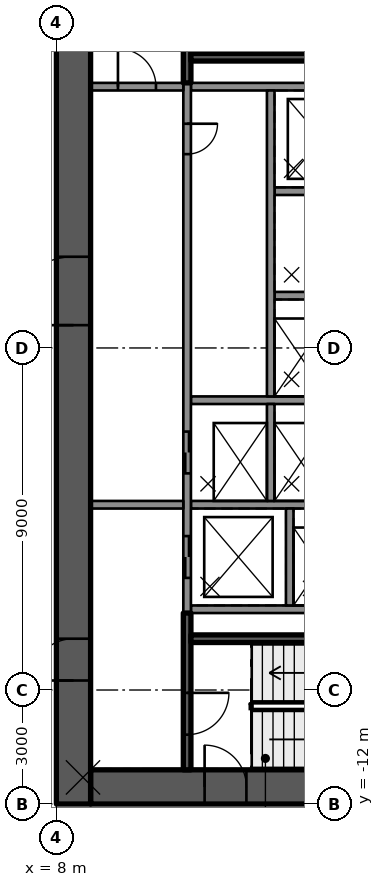
"""IFC4 building model, lengths in metres.
Left out: names, types, materials, properties, quantities, classifications, styles, units other than length and angle.
Written with IfcOpenShell. Run it as: python <this file> out.ifc"""

import sys

from ifc_helpers import new_model, si_unit, direction, frame, frame_2d, origin, place, context, subcontext, project, spatial, rectangle, extrude, element, fill, save


model = new_model("IFC4")
c1 = context("Model", 3, precision=1e-05, world=origin(), true_north=direction((0.0, 1.0)))
c2 = subcontext(c1, "Body", "Model", "MODEL_VIEW")
j1 = project(units=[si_unit("LENGTHUNIT", "METRE"), si_unit("PLANEANGLEUNIT", "RADIAN")], contexts=[c1])
p1 = place(None, origin())
s1 = spatial("IfcSite", under=j1, at=p1, CompositionType="ELEMENT")
p2 = place(p1, origin())
s2 = spatial("IfcBuilding", under=s1, at=p2, CompositionType="ELEMENT")
p3 = place(p2, frame((0.0, 0.0, 163.1)))
s3 = spatial("IfcBuildingStorey", under=s2, at=p3, CompositionType="ELEMENT", Elevation=163.1)
p4 = place(p3, frame((8.9, -11.55, 0.0), z_axis=(0.0, 0.0, 1.0), x_axis=(1.0, 0.0, 0.0)))
e1 = element("IfcWall", 1, at=p4, inside=s3, PredefinedType="SHEAR", context=c2, shape_type="SweptSolid", body=[
    extrude(rectangle(XDim=9.2, YDim=0.9, at=frame_2d((4.6, 0.0))), origin(), (0.0, 0.0, 1.0), 4.0),
])
p5 = place(p4, frame((3.0, 0.0, 0.0)))
e2 = element("IfcOpeningElement", 2, at=p5, cuts=e1, PredefinedType="OPENING", context=c2, shape_type="SweptSolid", body=[
    extrude(rectangle(XDim=1.1, YDim=2.1, at=frame_2d((0.55, 1.05))), frame((0.0, 0.46, 0.0), z_axis=(0.0, -1.0, 0.0), x_axis=(1.0, 0.0, 0.0)), (0.0, 0.0, 1.0), 0.92),
])
p6 = place(p3, frame((8.45, -12.0, 0.0), z_axis=(0.0, 0.0, 1.0), x_axis=(0.0, 1.0, 0.0)))
e3 = element("IfcWall", 3, at=p6, inside=s3, PredefinedType="SHEAR", context=c2, shape_type="SweptSolid", body=[
    extrude(rectangle(XDim=24.0, YDim=0.9, at=frame_2d((12.0, 0.0))), origin(), (0.0, 0.0, 1.0), 4.0),
])
p7 = place(p6, frame((12.6, 0.0, 0.0)))
e4 = element("IfcOpeningElement", 4, at=p7, cuts=e3, PredefinedType="OPENING", context=c2, shape_type="SweptSolid", body=[
    extrude(rectangle(XDim=1.8, YDim=2.1, at=frame_2d((0.9, 1.05))), frame((0.0, 0.46, 0.0), z_axis=(0.0, -1.0, 0.0), x_axis=(1.0, 0.0, 0.0)), (0.0, 0.0, 1.0), 0.92),
])
p8 = place(p6, frame((3.25, 0.0, 0.0)))
e5 = element("IfcOpeningElement", 5, at=p8, cuts=e3, PredefinedType="OPENING", context=c2, shape_type="SweptSolid", body=[
    extrude(rectangle(XDim=1.1, YDim=2.1, at=frame_2d((0.55, 1.05))), frame((0.0, 0.46, 0.0), z_axis=(0.0, -1.0, 0.0), x_axis=(1.0, 0.0, 0.0)), (0.0, 0.0, 1.0), 0.92),
])
for number, where, z_axis, x_axis in (
    (6, (11.54, -6.875, 0.0), (0.0, 0.0, 1.0), (1.0, 0.0, 0.0)),
    (7, (11.54, 6.875, 0.0), (0.0, 0.0, 1.0), (1.0, 0.0, 0.0)),
):
    element("IfcWall", number, at=place(p3, frame(where, z_axis=z_axis, x_axis=x_axis)), inside=s3, PredefinedType="SOLIDWALL", context=c2, shape_type="SweptSolid", body=[
        extrude(rectangle(XDim=6.56, YDim=0.2, at=frame_2d((3.28, 0.0))), origin(), (0.0, 0.0, 1.0), 3.58),
    ])
p9 = place(p3, frame((13.74, 4.125, 0.0), z_axis=(0.0, 0.0, 1.0), x_axis=(1.0, 0.0, 0.0)))
e8 = element("IfcWall", 8, at=p9, inside=s3, PredefinedType="SOLIDWALL", context=c2, shape_type="SweptSolid", body=[
    extrude(rectangle(XDim=2.5, YDim=0.2, at=frame_2d((1.25, 0.0))), origin(), (0.0, 0.0, 1.0), 3.58),
])
p10 = place(p3, frame((13.74, 1.375, 0.0), z_axis=(0.0, 0.0, 1.0), x_axis=(1.0, 0.0, 0.0)))
e9 = element("IfcWall", 9, at=p10, inside=s3, PredefinedType="SOLIDWALL", context=c2, shape_type="SweptSolid", body=[
    extrude(rectangle(XDim=2.0, YDim=0.2, at=frame_2d((1.0, 0.0))), origin(), (0.0, 0.0, 1.0), 3.58),
])
p11 = place(p3, frame((11.54, -1.375, 0.0), z_axis=(0.0, 0.0, 1.0), x_axis=(1.0, 0.0, 0.0)))
e10 = element("IfcWall", 10, at=p11, inside=s3, PredefinedType="SOLIDWALL", context=c2, shape_type="SweptSolid", body=[
    extrude(rectangle(XDim=4.2, YDim=0.2, at=frame_2d((2.1, 0.0))), origin(), (0.0, 0.0, 1.0), 3.58),
])
p12 = place(p3, frame((11.54, -4.125, 0.0), z_axis=(0.0, 0.0, 1.0), x_axis=(1.0, 0.0, 0.0)))
e11 = element("IfcWall", 11, at=p12, inside=s3, PredefinedType="SOLIDWALL", context=c2, shape_type="SweptSolid", body=[
    extrude(rectangle(XDim=4.7, YDim=0.2, at=frame_2d((2.35, 0.0))), origin(), (0.0, 0.0, 1.0), 3.58),
])
p13 = place(p3, frame((11.44, 6.975, 0.0), z_axis=(0.0, 0.0, 1.0), x_axis=(0.0, -1.0, 0.0)))
e12 = element("IfcWall", 12, at=p13, inside=s3, PredefinedType="SOLIDWALL", context=c2, shape_type="SweptSolid", body=[
    extrude(rectangle(XDim=13.95, YDim=0.2, at=frame_2d((6.975, 0.0))), origin(), (0.0, 0.0, 1.0), 3.58),
])
p14 = place(p13, frame((9.175, 0.0, 0.0)))
e13 = element("IfcOpeningElement", 13, at=p14, cuts=e12, PredefinedType="OPENING", context=c2, shape_type="SweptSolid", body=[
    extrude(rectangle(XDim=1.1, YDim=2.1, at=frame_2d((0.55, 1.05))), frame((0.0, 0.11, 0.0), z_axis=(0.0, -1.0, 0.0), x_axis=(1.0, 0.0, 0.0)), (0.0, 0.0, 1.0), 0.22),
])
p15 = place(p13, frame((11.925, 0.0, 0.0)))
e14 = element("IfcOpeningElement", 14, at=p15, cuts=e12, PredefinedType="OPENING", context=c2, shape_type="SweptSolid", body=[
    extrude(rectangle(XDim=1.1, YDim=2.1, at=frame_2d((0.55, 1.05))), frame((0.0, 0.11, 0.0), z_axis=(0.0, -1.0, 0.0), x_axis=(1.0, 0.0, 0.0)), (0.0, 0.0, 1.0), 0.22),
])
p16 = place(p13, frame((1.075, 0.0, 0.0)))
e15 = element("IfcOpeningElement", 15, at=p16, cuts=e12, PredefinedType="OPENING", context=c2, shape_type="SweptSolid", body=[
    extrude(rectangle(XDim=0.8, YDim=2.1, at=frame_2d((0.4, 1.05))), frame((0.0, 0.11, 0.0), z_axis=(0.0, -1.0, 0.0), x_axis=(1.0, 0.0, 0.0)), (0.0, 0.0, 1.0), 0.22),
])
p17 = place(p3, frame((13.64, 6.775, 0.0), z_axis=(0.0, 0.0, 1.0), x_axis=(0.0, -1.0, 0.0)))
e16 = element("IfcWall", 16, at=p17, inside=s3, PredefinedType="SOLIDWALL", context=c2, shape_type="SweptSolid", body=[
    extrude(rectangle(XDim=8.05, YDim=0.2, at=frame_2d((4.025, 0.0))), origin(), (0.0, 0.0, 1.0), 3.58),
])
for number, where, z_axis, x_axis in (
    (17, (13.64, -1.475, 0.0), (0.0, 0.0, 1.0), (0.0, -1.0, 0.0)),
    (18, (14.14, -4.225, 0.0), (0.0, 0.0, 1.0), (0.0, -1.0, 0.0)),
):
    element("IfcWall", number, at=place(p3, frame(where, z_axis=z_axis, x_axis=x_axis)), inside=s3, PredefinedType="SOLIDWALL", context=c2, shape_type="SweptSolid", body=[
        extrude(rectangle(XDim=2.55, YDim=0.2, at=frame_2d((1.275, 0.0))), origin(), (0.0, 0.0, 1.0), 3.58),
    ])
p18 = place(p3, frame((11.44, -6.975, 0.0), z_axis=(0.0, 0.0, 1.0), x_axis=(0.0, -1.0, 0.0)))
e19 = element("IfcWall", 19, at=p18, inside=s3, PredefinedType="SOLIDWALL", context=c2, shape_type="SweptSolid", body=[
    extrude(rectangle(XDim=4.125, YDim=0.2, at=frame_2d((2.062, 0.0))), origin(), (0.0, 0.0, 1.0), 3.58),
])
p19 = place(p18, frame((2.1, 0.0, 0.0)))
e20 = element("IfcOpeningElement", 20, at=p19, cuts=e19, PredefinedType="OPENING", context=c2, shape_type="SweptSolid", body=[
    extrude(rectangle(XDim=1.1, YDim=2.1, at=frame_2d((0.55, 1.05))), frame((0.0, 0.11, 0.0), z_axis=(0.0, -1.0, 0.0), x_axis=(1.0, 0.0, 0.0)), (0.0, 0.0, 1.0), 0.22),
])
p20 = place(p3, frame((11.54, -7.65, 0.0), z_axis=(0.0, 0.0, 1.0), x_axis=(1.0, 0.0, 0.0)))
e21 = element("IfcWall", 21, at=p20, inside=s3, PredefinedType="SOLIDWALL", context=c2, shape_type="SweptSolid", body=[
    extrude(rectangle(XDim=6.56, YDim=0.2, at=frame_2d((3.28, 0.0))), origin(), (0.0, 0.0, 1.0), 3.58),
])
p21 = place(p3, frame((11.44, 11.1, 0.0), z_axis=(0.0, 0.0, 1.0), x_axis=(0.0, -1.0, 0.0)))
e22 = element("IfcWall", 22, at=p21, inside=s3, PredefinedType="SOLIDWALL", context=c2, shape_type="SweptSolid", body=[
    extrude(rectangle(XDim=4.125, YDim=0.2, at=frame_2d((2.062, 0.0))), origin(), (0.0, 0.0, 1.0), 3.58),
])
p22 = place(p3, frame((11.54, 7.65, 0.0), z_axis=(0.0, 0.0, 1.0), x_axis=(1.0, 0.0, 0.0)))
e23 = element("IfcWall", 23, at=p22, inside=s3, PredefinedType="SOLIDWALL", context=c2, shape_type="SweptSolid", body=[
    extrude(rectangle(XDim=6.56, YDim=0.2, at=frame_2d((3.28, 0.0))), origin(), (0.0, 0.0, 1.0), 3.58),
])
p23 = place(p3, frame((8.9, -4.125, 0.0), z_axis=(0.0, 0.0, 1.0), x_axis=(1.0, 0.0, 0.0)))
e24 = element("IfcWall", 24, at=p23, inside=s3, PredefinedType="PARTITIONING", context=c2, shape_type="SweptSolid", body=[
    extrude(rectangle(XDim=2.44, YDim=0.2, at=frame_2d((1.22, 0.0))), origin(), (0.0, 0.0, 1.0), 3.58),
])
p24 = place(p3, frame((8.9, 6.875, 0.0), z_axis=(0.0, 0.0, 1.0), x_axis=(1.0, 0.0, 0.0)))
e25 = element("IfcWall", 25, at=p24, inside=s3, PredefinedType="PARTITIONING", context=c2, shape_type="SweptSolid", body=[
    extrude(rectangle(XDim=2.44, YDim=0.2, at=frame_2d((1.22, 0.0))), origin(), (0.0, 0.0, 1.0), 3.58),
])
p25 = place(p24, frame((0.72, 0.0, 0.0)))
e26 = element("IfcOpeningElement", 26, at=p25, cuts=e25, PredefinedType="OPENING", context=c2, shape_type="SweptSolid", body=[
    extrude(rectangle(XDim=1.0, YDim=2.1, at=frame_2d((0.5, 1.05))), frame((0.0, 0.11, 0.0), z_axis=(0.0, -1.0, 0.0), x_axis=(1.0, 0.0, 0.0)), (0.0, 0.0, 1.0), 0.22),
])
p26 = place(p14, origin())
e27 = element("IfcDoor", 27, at=p26, inside=s3, OperationType="DOUBLE_DOOR_SLIDING", PredefinedType="DOOR", context=c2, shape_type="SweptSolid", body=[
    extrude(rectangle(XDim=1.1, YDim=2.1, at=frame_2d((0.55, 1.05))), frame((0.0, 0.025, 0.0), z_axis=(0.0, -1.0, 0.0), x_axis=(1.0, 0.0, 0.0)), (0.0, 0.0, 1.0), 0.05),
])
fill(e13, e27)
p27 = place(p15, origin())
e28 = element("IfcDoor", 28, at=p27, inside=s3, OperationType="DOUBLE_DOOR_SLIDING", PredefinedType="DOOR", context=c2, shape_type="SweptSolid", body=[
    extrude(rectangle(XDim=1.1, YDim=2.1, at=frame_2d((0.55, 1.05))), frame((0.0, 0.025, 0.0), z_axis=(0.0, -1.0, 0.0), x_axis=(1.0, 0.0, 0.0)), (0.0, 0.0, 1.0), 0.05),
])
fill(e14, e28)
p28 = place(p16, origin())
e29 = element("IfcDoor", 29, at=p28, inside=s3, OperationType="SINGLE_SWING_LEFT", PredefinedType="DOOR", context=c2, shape_type="SweptSolid", body=[
    extrude(rectangle(XDim=0.8, YDim=2.1, at=frame_2d((0.4, 1.05))), frame((0.0, 0.025, 0.0), z_axis=(0.0, -1.0, 0.0), x_axis=(1.0, 0.0, 0.0)), (0.0, 0.0, 1.0), 0.05),
])
fill(e15, e29)
p29 = place(p7, origin())
e30 = element("IfcDoor", 30, at=p29, inside=s3, OperationType="SINGLE_SWING_RIGHT", PredefinedType="DOOR", context=c2, shape_type="SweptSolid", body=[
    extrude(rectangle(XDim=1.8, YDim=2.1, at=frame_2d((0.9, 1.05))), frame((0.0, 0.025, 0.0), z_axis=(0.0, -1.0, 0.0), x_axis=(1.0, 0.0, 0.0)), (0.0, 0.0, 1.0), 0.05),
])
fill(e4, e30)
p30 = place(p8, origin())
e31 = element("IfcDoor", 31, at=p30, inside=s3, OperationType="SINGLE_SWING_LEFT", PredefinedType="DOOR", context=c2, shape_type="SweptSolid", body=[
    extrude(rectangle(XDim=1.1, YDim=2.1, at=frame_2d((0.55, 1.05))), frame((0.0, 0.025, 0.0), z_axis=(0.0, -1.0, 0.0), x_axis=(1.0, 0.0, 0.0)), (0.0, 0.0, 1.0), 0.05),
])
fill(e5, e31)
p31 = place(p5, origin())
e32 = element("IfcDoor", 32, at=p31, inside=s3, OperationType="SINGLE_SWING_LEFT", PredefinedType="DOOR", context=c2, shape_type="SweptSolid", body=[
    extrude(rectangle(XDim=1.1, YDim=2.1, at=frame_2d((0.55, 1.05))), frame((0.0, 0.025, 0.0), z_axis=(0.0, -1.0, 0.0), x_axis=(1.0, 0.0, 0.0)), (0.0, 0.0, 1.0), 0.05),
])
fill(e2, e32)
p32 = place(p19, origin())
e33 = element("IfcDoor", 33, at=p32, inside=s3, OperationType="SINGLE_SWING_RIGHT", PredefinedType="DOOR", context=c2, shape_type="SweptSolid", body=[
    extrude(rectangle(XDim=1.1, YDim=2.1, at=frame_2d((0.55, 1.05))), frame((0.0, 0.025, 0.0), z_axis=(0.0, -1.0, 0.0), x_axis=(1.0, 0.0, 0.0)), (0.0, 0.0, 1.0), 0.05),
])
fill(e20, e33)
p33 = place(p25, origin())
e34 = element("IfcDoor", 34, at=p33, inside=s3, OperationType="SINGLE_SWING_RIGHT", PredefinedType="DOOR", context=c2, shape_type="SweptSolid", body=[
    extrude(rectangle(XDim=1.0, YDim=2.1, at=frame_2d((0.5, 1.05))), frame((0.0, 0.025, 0.0), z_axis=(0.0, -1.0, 0.0), x_axis=(1.0, 0.0, 0.0)), (0.0, 0.0, 1.0), 0.05),
])
fill(e26, e34)
save(model, sys.argv[1])
